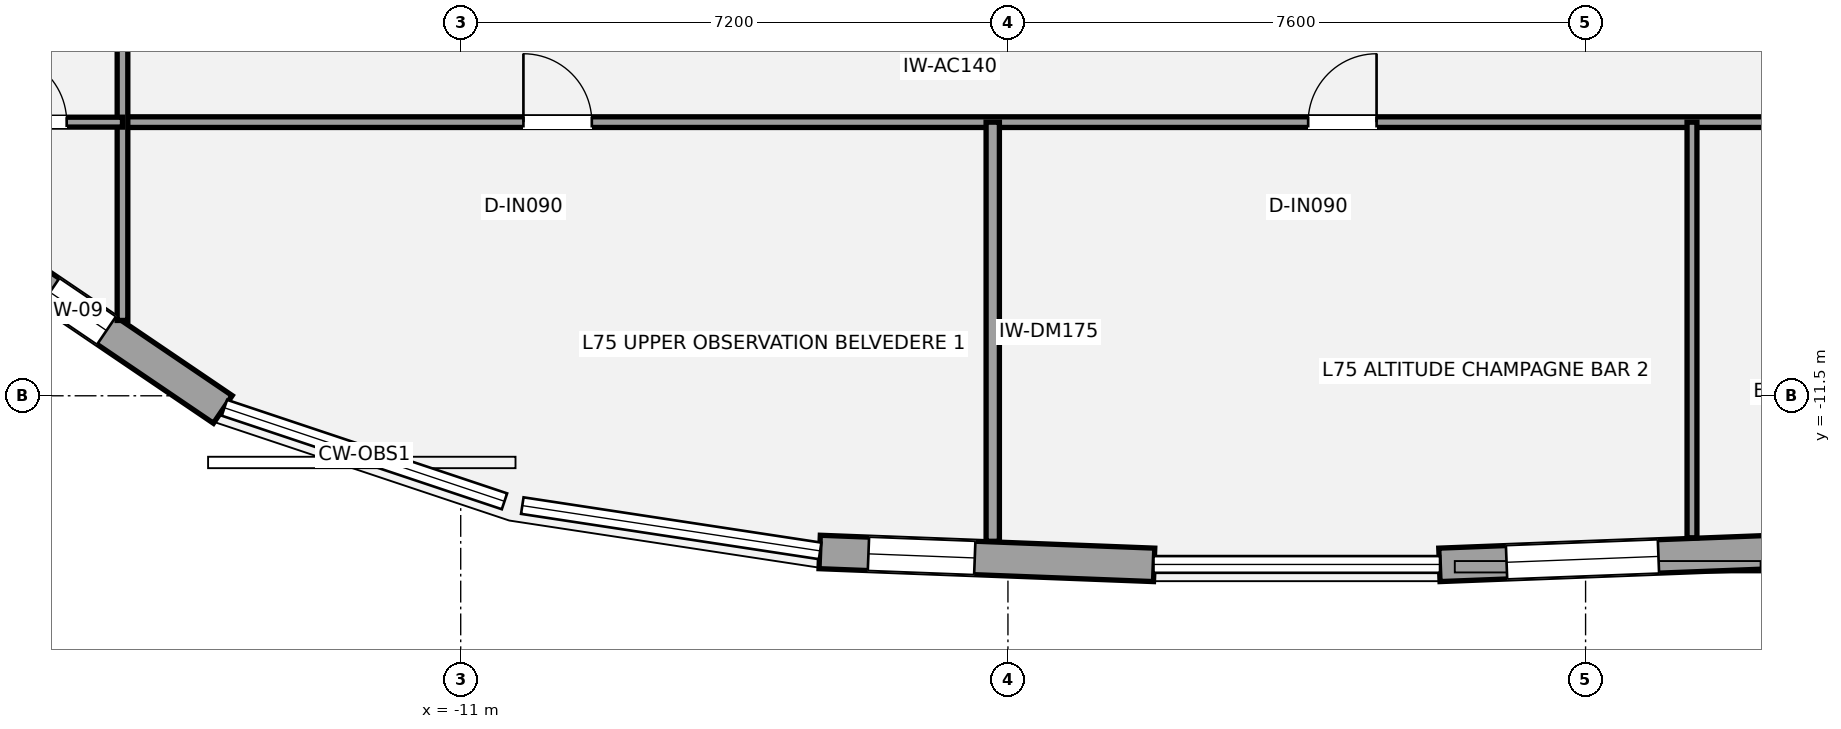
"""IFC4 building model, lengths in metres.
Left out: names, types, materials, properties, quantities, classifications, styles, units other than length and angle.
Written with IfcOpenShell. Run it as: python <this file> out.ifc"""

import sys

from ifc_helpers import new_model, si_unit, direction, frame, frame_2d, origin, place, context, subcontext, project, spatial, rectangle, extrude, element, fill, save


model = new_model("IFC4")
c1 = context("Model", 3, precision=1e-05, world=origin(), true_north=direction((0.0, 1.0)))
c2 = subcontext(c1, "Body", "Model", "MODEL_VIEW")
j1 = project(units=[si_unit("LENGTHUNIT", "METRE"), si_unit("PLANEANGLEUNIT", "RADIAN")], contexts=[c1])
p1 = place(None, origin())
s1 = spatial("IfcSite", under=j1, at=p1, CompositionType="ELEMENT")
p2 = place(p1, origin())
s2 = spatial("IfcBuilding", under=s1, at=p2, CompositionType="ELEMENT")
p3 = place(p2, frame((0.0, 0.0, 264.8)))
s3 = spatial("IfcBuildingStorey", under=s2, at=p3, CompositionType="ELEMENT", Elevation=264.8)
p4 = place(p3, frame((-14.13, -11.679, 0.0), z_axis=(0.0, 0.0, 1.0), x_axis=(-0.827730474906, 0.561125886867, 0.0)))
e1 = element("IfcWall", 1, at=p4, inside=s3, PredefinedType="STANDARD", context=c2, shape_type="SweptSolid", body=[
    extrude(rectangle(XDim=3.848, YDim=0.44, at=frame_2d((1.924, 0.0))), origin(), (0.0, 0.0, 1.0), 3.566),
])
p5 = place(p4, frame((1.849, 0.0, 0.58)))
e2 = element("IfcOpeningElement", 2, at=p5, cuts=e1, PredefinedType="OPENING", context=c2, shape_type="SweptSolid", body=[
    extrude(rectangle(XDim=0.9, YDim=1.35, at=frame_2d((0.45, 0.675))), frame((0.0, 0.23, 0.0), z_axis=(0.0, -1.0, 0.0), x_axis=(1.0, 0.0, 0.0)), (0.0, 0.0, 1.0), 0.46),
])
p6 = place(p3, frame((-1.877, -13.725, 0.0), z_axis=(0.0, 0.0, 1.0), x_axis=(-0.999255266714, 0.038586421751, 0.0)))
e3 = element("IfcWall", 3, at=p6, inside=s3, PredefinedType="STANDARD", context=c2, shape_type="SweptSolid", body=[
    extrude(rectangle(XDim=4.404, YDim=0.44, at=frame_2d((2.202, 0.0))), origin(), (0.0, 0.0, 1.0), 3.566),
])
p7 = place(p6, frame((2.362, 0.0, 0.58)))
e4 = element("IfcOpeningElement", 4, at=p7, cuts=e3, PredefinedType="OPENING", context=c2, shape_type="SweptSolid", body=[
    extrude(rectangle(XDim=1.4, YDim=1.55, at=frame_2d((0.7, 0.775))), frame((0.0, 0.23, 0.0), z_axis=(0.0, -1.0, 0.0), x_axis=(1.0, 0.0, 0.0)), (0.0, 0.0, 1.0), 0.46),
])
p8 = place(p3, frame((6.277, -13.555, 0.0), z_axis=(0.0, 0.0, 1.0), x_axis=(-0.999255266714, -0.038586421751, 0.0)))
e5 = element("IfcWall", 5, at=p8, inside=s3, PredefinedType="STANDARD", context=c2, shape_type="SweptSolid", body=[
    extrude(rectangle(XDim=4.404, YDim=0.44, at=frame_2d((2.202, 0.0))), origin(), (0.0, 0.0, 1.0), 3.566),
])
p9 = place(p8, frame((1.52, 0.0, 0.6)))
e6 = element("IfcOpeningElement", 6, at=p9, cuts=e5, PredefinedType="OPENING", context=c2, shape_type="SweptSolid", body=[
    extrude(rectangle(XDim=2.0, YDim=2.1, at=frame_2d((1.0, 1.05))), frame((0.0, 0.23, 0.0), z_axis=(0.0, -1.0, 0.0), x_axis=(1.0, 0.0, 0.0)), (0.0, 0.0, 1.0), 0.46),
])
p10 = place(p3, frame((-15.45, -7.9, 0.0), z_axis=(0.0, 0.0, 1.0), x_axis=(1.0, 0.0, 0.0)))
e7 = element("IfcWall", 7, at=p10, inside=s3, PredefinedType="PARTITIONING", context=c2, shape_type="SweptSolid", body=[
    extrude(rectangle(XDim=30.9, YDim=0.14, at=frame_2d((15.45, 0.0))), origin(), (0.0, 0.0, 1.0), 3.661),
])
p11 = place(p10, frame((5.275, 0.0, 0.0)))
e8 = element("IfcOpeningElement", 8, at=p11, cuts=e7, PredefinedType="OPENING", context=c2, shape_type="SweptSolid", body=[
    extrude(rectangle(XDim=0.9, YDim=2.1, at=frame_2d((0.45, 1.05))), frame((0.0, 0.08, 0.0), z_axis=(0.0, -1.0, 0.0), x_axis=(1.0, 0.0, 0.0)), (0.0, 0.0, 1.0), 0.16),
])
p12 = place(p10, frame((15.6, 0.0, 0.0)))
e9 = element("IfcOpeningElement", 9, at=p12, cuts=e7, PredefinedType="OPENING", context=c2, shape_type="SweptSolid", body=[
    extrude(rectangle(XDim=0.9, YDim=2.1, at=frame_2d((0.45, 1.05))), frame((0.0, 0.08, 0.0), z_axis=(0.0, -1.0, 0.0), x_axis=(1.0, 0.0, 0.0)), (0.0, 0.0, 1.0), 0.16),
])
p13 = place(p10, frame((25.025, 0.0, 0.0)))
e10 = element("IfcOpeningElement", 10, at=p13, cuts=e7, PredefinedType="OPENING", context=c2, shape_type="SweptSolid", body=[
    extrude(rectangle(XDim=1.5, YDim=2.15, at=frame_2d((0.75, 1.075))), frame((0.0, 0.08, 0.0), z_axis=(0.0, -1.0, 0.0), x_axis=(1.0, 0.0, 0.0)), (0.0, 0.0, 1.0), 0.16),
])
p14 = place(p3, frame((-15.45, -10.509, 0.0), z_axis=(0.0, 0.0, 1.0), x_axis=(0.0, 1.0, 0.0)))
e11 = element("IfcWall", 11, at=p14, inside=s3, PredefinedType="PARTITIONING", context=c2, shape_type="SweptSolid", body=[
    extrude(rectangle(XDim=11.909, YDim=0.14, at=frame_2d((5.955, 0.0))), origin(), (0.0, 0.0, 1.0), 3.661),
])
p15 = place(p14, frame((4.859, 0.0, 0.0)))
e12 = element("IfcOpeningElement", 12, at=p15, cuts=e11, PredefinedType="OPENING", context=c2, shape_type="SweptSolid", body=[
    extrude(rectangle(XDim=0.9, YDim=2.1, at=frame_2d((0.45, 1.05))), frame((0.0, 0.08, 0.0), z_axis=(0.0, -1.0, 0.0), x_axis=(1.0, 0.0, 0.0)), (0.0, 0.0, 1.0), 0.16),
])
p16 = place(p14, frame((9.509, 0.0, 0.0)))
e13 = element("IfcOpeningElement", 13, at=p16, cuts=e11, PredefinedType="OPENING", context=c2, shape_type="SweptSolid", body=[
    extrude(rectangle(XDim=0.9, YDim=2.1, at=frame_2d((0.45, 1.05))), frame((0.0, 0.08, 0.0), z_axis=(0.0, -1.0, 0.0), x_axis=(1.0, 0.0, 0.0)), (0.0, 0.0, 1.0), 0.16),
])
p17 = place(p3, frame((-4.0, -13.415, 0.0), z_axis=(0.0, 0.0, 1.0), x_axis=(0.0, 1.0, 0.0)))
e14 = element("IfcWall", 14, at=p17, inside=s3, PredefinedType="PARTITIONING", context=c2, shape_type="SweptSolid", body=[
    extrude(rectangle(XDim=5.515, YDim=0.175, at=frame_2d((2.757, 0.0))), origin(), (0.0, 0.0, 1.0), 4.2),
])
p18 = place(p3, frame((5.2, -13.368, 0.0), z_axis=(0.0, 0.0, 1.0), x_axis=(0.0, 1.0, 0.0)))
e15 = element("IfcWall", 15, at=p18, inside=s3, PredefinedType="PARTITIONING", context=c2, shape_type="SweptSolid", body=[
    extrude(rectangle(XDim=5.468, YDim=0.13, at=frame_2d((2.734, 0.0))), origin(), (0.0, 0.0, 1.0), 4.2),
])
p19 = place(p3, frame((-18.194, -7.9, 0.0), z_axis=(0.0, 0.0, 1.0), x_axis=(1.0, 0.0, 0.0)))
e16 = element("IfcWall", 16, at=p19, inside=s3, PredefinedType="PARTITIONING", context=c2, shape_type="SweptSolid", body=[
    extrude(rectangle(XDim=2.744, YDim=0.13, at=frame_2d((1.372, 0.0))), origin(), (0.0, 0.0, 1.0), 4.2),
])
p20 = place(p19, frame((1.11, 0.0, 0.0)))
e17 = element("IfcOpeningElement", 17, at=p20, cuts=e16, PredefinedType="OPENING", context=c2, shape_type="SweptSolid", body=[
    extrude(rectangle(XDim=0.9, YDim=2.1, at=frame_2d((0.45, 1.05))), frame((0.0, 0.075, 0.0), z_axis=(0.0, -1.0, 0.0), x_axis=(1.0, 0.0, 0.0)), (0.0, 0.0, 1.0), 0.15),
])
p21 = place(p5, origin())
e18 = element("IfcWindow", 18, at=p21, inside=s3, PartitioningType="SINGLE_PANEL", PredefinedType="WINDOW", context=c2, shape_type="SweptSolid", body=[
    extrude(rectangle(XDim=0.9, YDim=1.35, at=frame_2d((0.45, 0.675))), frame((0.0, -0.01, 0.0), z_axis=(0.0, -1.0, 0.0), x_axis=(1.0, 0.0, 0.0)), (0.0, 0.0, 1.0), 0.06),
])
fill(e2, e18)
p22 = place(p7, origin())
e19 = element("IfcWindow", 19, at=p22, inside=s3, PartitioningType="SINGLE_PANEL", PredefinedType="WINDOW", context=c2, shape_type="SweptSolid", body=[
    extrude(rectangle(XDim=1.4, YDim=1.55, at=frame_2d((0.7, 0.775))), frame((0.0, -0.01, 0.0), z_axis=(0.0, -1.0, 0.0), x_axis=(1.0, 0.0, 0.0)), (0.0, 0.0, 1.0), 0.06),
])
fill(e4, e19)
p23 = place(p9, origin())
e20 = element("IfcWindow", 20, at=p23, inside=s3, PartitioningType="SINGLE_PANEL", PredefinedType="WINDOW", context=c2, shape_type="SweptSolid", body=[
    extrude(rectangle(XDim=2.0, YDim=2.1, at=frame_2d((1.0, 1.05))), frame((0.0, -0.01, 0.0), z_axis=(0.0, -1.0, 0.0), x_axis=(1.0, 0.0, 0.0)), (0.0, 0.0, 1.0), 0.06),
])
fill(e6, e20)
p24 = place(p11, origin())
e21 = element("IfcDoor", 21, at=p24, inside=s3, OperationType="SINGLE_SWING_LEFT", PredefinedType="DOOR", context=c2, shape_type="SweptSolid", body=[
    extrude(rectangle(XDim=0.9, YDim=2.1, at=frame_2d((0.45, 1.05))), frame((0.0, 0.025, 0.0), z_axis=(0.0, -1.0, 0.0), x_axis=(1.0, 0.0, 0.0)), (0.0, 0.0, 1.0), 0.05),
])
fill(e8, e21)
p25 = place(p12, origin())
e22 = element("IfcDoor", 22, at=p25, inside=s3, OperationType="SINGLE_SWING_RIGHT", PredefinedType="DOOR", context=c2, shape_type="SweptSolid", body=[
    extrude(rectangle(XDim=0.9, YDim=2.1, at=frame_2d((0.45, 1.05))), frame((0.0, 0.025, 0.0), z_axis=(0.0, -1.0, 0.0), x_axis=(1.0, 0.0, 0.0)), (0.0, 0.0, 1.0), 0.05),
])
fill(e9, e22)
p26 = place(p20, origin())
e23 = element("IfcDoor", 23, at=p26, inside=s3, OperationType="SINGLE_SWING_LEFT", PredefinedType="DOOR", context=c2, shape_type="SweptSolid", body=[
    extrude(rectangle(XDim=0.9, YDim=2.1, at=frame_2d((0.45, 1.05))), frame((0.0, 0.025, 0.0), z_axis=(0.0, -1.0, 0.0), x_axis=(1.0, 0.0, 0.0)), (0.0, 0.0, 1.0), 0.05),
])
fill(e17, e23)
save(model, sys.argv[1])
